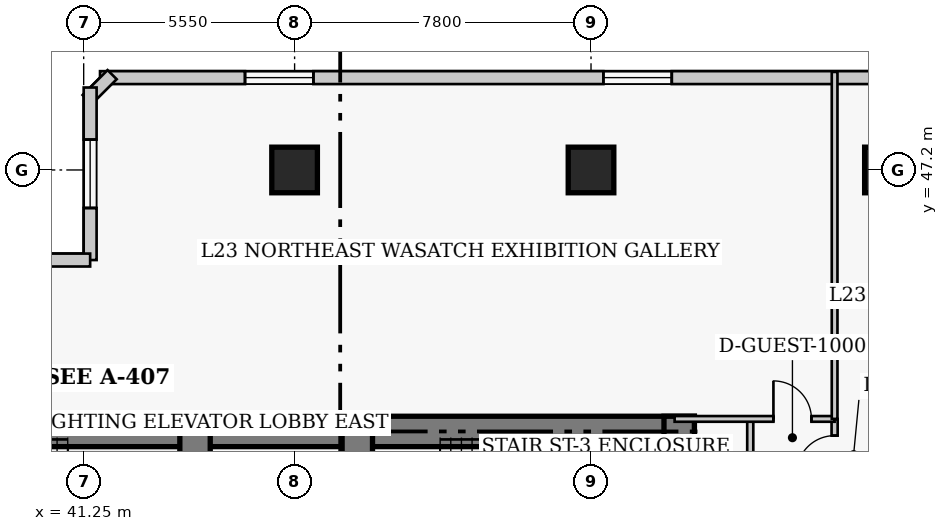
"""IFC4 building model, lengths in metres.
Left out: names, types, materials, properties, quantities, classifications, styles, units other than length and angle.
Written with IfcOpenShell. Run it as: python <this file> out.ifc"""

import sys

from ifc_helpers import new_model, si_unit, direction, frame, frame_2d, origin, origin_2d, place, context, subcontext, project, spatial, rectangle, extrude, element, fill, save


model = new_model("IFC4")
c1 = context("Model", 3, precision=1e-05, world=origin(), true_north=direction((0.0, 1.0)))
c2 = subcontext(c1, "Body", "Model", "MODEL_VIEW")
j1 = project(units=[si_unit("LENGTHUNIT", "METRE"), si_unit("PLANEANGLEUNIT", "RADIAN")], contexts=[c1])
p1 = place(None, origin())
s1 = spatial("IfcSite", under=j1, at=p1, CompositionType="ELEMENT")
p2 = place(p1, origin())
s2 = spatial("IfcBuilding", under=s1, at=p2, CompositionType="ELEMENT")
p3 = place(p2, frame((0.0, 0.0, 95.6)))
s3 = spatial("IfcBuildingStorey", under=s2, at=p3, CompositionType="ELEMENT", Elevation=95.6)
p4 = place(p3, frame((35.85, 40.32, 0.0), z_axis=(0.0, 0.0, 1.0), x_axis=(1.0, 0.0, 0.0)))
e1 = element("IfcWall", 1, at=p4, inside=s3, PredefinedType="SHEAR", context=c2, shape_type="SweptSolid", body=[
    extrude(rectangle(XDim=12.6, YDim=0.8, at=frame_2d((6.3, 0.0))), origin(), (0.0, 0.0, 1.0), 3.8),
])
p5 = place(p3, frame((48.45, 40.32, 0.0), z_axis=(0.0, 0.0, 1.0), x_axis=(1.0, 0.0, 0.0)))
e2 = element("IfcWall", 2, at=p5, inside=s3, PredefinedType="SHEAR", context=c2, shape_type="SweptSolid", body=[
    extrude(rectangle(XDim=8.87, YDim=0.8, at=frame_2d((4.435, 0.0))), origin(), (0.0, 0.0, 1.0), 3.8),
])
p6 = place(p3, frame((56.92, 27.05, 0.0), z_axis=(0.0, 0.0, 1.0), x_axis=(0.0, 1.0, 0.0)))
e3 = element("IfcWall", 3, at=p6, inside=s3, PredefinedType="SHEAR", context=c2, shape_type="SweptSolid", body=[
    extrude(rectangle(XDim=13.67, YDim=0.8, at=frame_2d((6.835, 0.0))), origin(), (0.0, 0.0, 1.0), 3.8),
])
p7 = place(p3, frame((44.18, 36.37, 0.0), z_axis=(0.0, 0.0, 1.0), x_axis=(0.0, 1.0, 0.0)))
e4 = element("IfcWall", 4, at=p7, inside=s3, PredefinedType="SHEAR", context=c2, shape_type="SweptSolid", body=[
    extrude(rectangle(XDim=3.95, YDim=0.8, at=frame_2d((1.975, 0.0))), origin(), (0.0, 0.0, 1.0), 3.8),
])
p8 = place(p3, frame((48.45, 32.35, 0.0), z_axis=(0.0, 0.0, 1.0), x_axis=(0.0, 1.0, 0.0)))
e5 = element("IfcWall", 5, at=p8, inside=s3, PredefinedType="SHEAR", context=c2, shape_type="SweptSolid", body=[
    extrude(rectangle(XDim=7.97, YDim=0.8, at=frame_2d((3.985, 0.0))), origin(), (0.0, 0.0, 1.0), 3.8),
])
p9 = place(p8, frame((5.85, 0.0, 0.0)))
e6 = element("IfcOpeningElement", 6, at=p9, cuts=e5, PredefinedType="OPENING", context=c2, shape_type="SweptSolid", body=[
    extrude(rectangle(XDim=1.1, YDim=2.15, at=frame_2d((0.55, 1.075))), frame((0.0, 0.41, 0.0), z_axis=(0.0, -1.0, 0.0), x_axis=(1.0, 0.0, 0.0)), (0.0, 0.0, 1.0), 0.82),
])
for number, where, z_axis, x_axis in (
    (7, (46.8, 47.2, 0.0), (0.0, 0.0, 1.0), (1.0, 0.0, 0.0)),
    (8, (54.6, 47.2, 0.0), (0.0, 0.0, 1.0), (1.0, 0.0, 0.0)),
    (9, (62.4, 47.2, 0.0), (0.0, 0.0, 1.0), (1.0, 0.0, 0.0)),
):
    element("IfcColumn", number, at=place(p3, frame(where, z_axis=z_axis, x_axis=x_axis)), inside=s3, PredefinedType="COLUMN", context=c2, shape_type="SweptSolid", body=[
        extrude(rectangle(XDim=1.2, YDim=1.2, at=origin_2d()), origin(), (0.0, 0.0, 1.0), 3.8),
    ])
p10 = place(p3, frame((69.97, 49.63, 0.0), z_axis=(0.0, 0.0, 1.0), x_axis=(-1.0, 0.0, 0.0)))
e10 = element("IfcWall", 10, at=p10, inside=s3, PredefinedType="SOLIDWALL", context=c2, shape_type="SweptSolid", body=[
    extrude(rectangle(XDim=28.29, YDim=0.34, at=frame_2d((14.145, 0.0))), origin(), (0.0, 0.0, 1.0), 3.54),
])
p11 = place(p10, frame((3.815, 0.0, 0.85)))
e11 = element("IfcOpeningElement", 11, at=p11, cuts=e10, PredefinedType="OPENING", context=c2, shape_type="SweptSolid", body=[
    extrude(rectangle(XDim=1.8, YDim=1.8, at=frame_2d((0.9, 0.9))), frame((0.0, 0.18, 0.0), z_axis=(0.0, -1.0, 0.0), x_axis=(1.0, 0.0, 0.0)), (0.0, 0.0, 1.0), 0.36),
])
p12 = place(p10, frame((13.245, 0.0, 0.85)))
e12 = element("IfcOpeningElement", 12, at=p12, cuts=e10, PredefinedType="OPENING", context=c2, shape_type="SweptSolid", body=[
    extrude(rectangle(XDim=1.8, YDim=1.8, at=frame_2d((0.9, 0.9))), frame((0.0, 0.18, 0.0), z_axis=(0.0, -1.0, 0.0), x_axis=(1.0, 0.0, 0.0)), (0.0, 0.0, 1.0), 0.36),
])
p13 = place(p10, frame((22.675, 0.0, 0.85)))
e13 = element("IfcOpeningElement", 13, at=p13, cuts=e10, PredefinedType="OPENING", context=c2, shape_type="SweptSolid", body=[
    extrude(rectangle(XDim=1.8, YDim=1.8, at=frame_2d((0.9, 0.9))), frame((0.0, 0.18, 0.0), z_axis=(0.0, -1.0, 0.0), x_axis=(1.0, 0.0, 0.0)), (0.0, 0.0, 1.0), 0.36),
])
p14 = place(p3, frame((41.999, 49.708, 0.0), z_axis=(0.0, 0.0, 1.0), x_axis=(-0.707238225886, -0.706975312048, 0.0)))
e14 = element("IfcWall", 14, at=p14, inside=s3, PredefinedType="SOLIDWALL", context=c2, shape_type="SweptSolid", body=[
    extrude(rectangle(XDim=0.929, YDim=0.34, at=frame_2d((0.464, 0.0))), origin(), (0.0, 0.0, 1.0), 3.54),
])
p15 = place(p3, frame((41.42, 49.37, 0.0), z_axis=(0.0, 0.0, 1.0), x_axis=(0.0, -1.0, 0.0)))
e15 = element("IfcWall", 15, at=p15, inside=s3, PredefinedType="SOLIDWALL", context=c2, shape_type="SweptSolid", body=[
    extrude(rectangle(XDim=4.54, YDim=0.34, at=frame_2d((2.27, 0.0))), origin(), (0.0, 0.0, 1.0), 3.54),
])
p16 = place(p15, frame((1.37, 0.0, 0.85)))
e16 = element("IfcOpeningElement", 16, at=p16, cuts=e15, PredefinedType="OPENING", context=c2, shape_type="SweptSolid", body=[
    extrude(rectangle(XDim=1.8, YDim=1.8, at=frame_2d((0.9, 0.9))), frame((0.0, 0.18, 0.0), z_axis=(0.0, -1.0, 0.0), x_axis=(1.0, 0.0, 0.0)), (0.0, 0.0, 1.0), 0.36),
])
p17 = place(p3, frame((41.42, 44.83, 0.0), z_axis=(0.0, 0.0, 1.0), x_axis=(-1.0, 0.0, 0.0)))
e17 = element("IfcWall", 17, at=p17, inside=s3, PredefinedType="SOLIDWALL", context=c2, shape_type="SweptSolid", body=[
    extrude(rectangle(XDim=4.84, YDim=0.34, at=frame_2d((2.42, 0.0))), origin(), (0.0, 0.0, 1.0), 3.54),
])
p18 = place(p17, frame((1.52, 0.0, 0.85)))
e18 = element("IfcOpeningElement", 18, at=p18, cuts=e17, PredefinedType="OPENING", context=c2, shape_type="SweptSolid", body=[
    extrude(rectangle(XDim=1.8, YDim=1.8, at=frame_2d((0.9, 0.9))), frame((0.0, 0.18, 0.0), z_axis=(0.0, -1.0, 0.0), x_axis=(1.0, 0.0, 0.0)), (0.0, 0.0, 1.0), 0.36),
])
p19 = place(p3, frame((61.01, 11.85, 0.0), z_axis=(0.0, 0.0, 1.0), x_axis=(0.0, 1.0, 0.0)))
e19 = element("IfcWall", 19, at=p19, inside=s3, PredefinedType="PARTITIONING", context=c2, shape_type="SweptSolid", body=[
    extrude(rectangle(XDim=28.8, YDim=0.16, at=frame_2d((14.4, 0.0))), origin(), (0.0, 0.0, 1.0), 3.54),
])
p20 = place(p19, frame((3.6, 0.0, 0.0)))
e20 = element("IfcOpeningElement", 20, at=p20, cuts=e19, PredefinedType="OPENING", context=c2, shape_type="SweptSolid", body=[
    extrude(rectangle(XDim=0.95, YDim=2.1, at=frame_2d((0.475, 1.05))), frame((0.0, 0.09, 0.0), z_axis=(0.0, -1.0, 0.0), x_axis=(1.0, 0.0, 0.0)), (0.0, 0.0, 1.0), 0.18),
])
p21 = place(p19, frame((10.019, 0.0, 0.0)))
e21 = element("IfcOpeningElement", 21, at=p21, cuts=e19, PredefinedType="OPENING", context=c2, shape_type="SweptSolid", body=[
    extrude(rectangle(XDim=0.95, YDim=2.1, at=frame_2d((0.475, 1.05))), frame((0.0, 0.09, 0.0), z_axis=(0.0, -1.0, 0.0), x_axis=(1.0, 0.0, 0.0)), (0.0, 0.0, 1.0), 0.18),
])
p22 = place(p19, frame((27.36, 0.0, 0.0)))
e22 = element("IfcOpeningElement", 22, at=p22, cuts=e19, PredefinedType="OPENING", context=c2, shape_type="SweptSolid", body=[
    extrude(rectangle(XDim=1.0, YDim=2.15, at=frame_2d((0.5, 1.075))), frame((0.0, 0.09, 0.0), z_axis=(0.0, -1.0, 0.0), x_axis=(1.0, 0.0, 0.0)), (0.0, 0.0, 1.0), 0.18),
])
p23 = place(p3, frame((58.79, 26.11, 0.0), z_axis=(0.0, 0.0, 1.0), x_axis=(0.0, 1.0, 0.0)))
e23 = element("IfcWall", 23, at=p23, inside=s3, PredefinedType="PARTITIONING", context=c2, shape_type="SweptSolid", body=[
    extrude(rectangle(XDim=14.54, YDim=0.16, at=frame_2d((7.27, 0.0))), origin(), (0.0, 0.0, 1.0), 3.54),
])
p24 = place(p3, frame((56.8, 40.65, 0.0), z_axis=(0.0, 0.0, 1.0), x_axis=(1.0, 0.0, 0.0)))
e24 = element("IfcWall", 24, at=p24, inside=s3, PredefinedType="PARTITIONING", context=c2, shape_type="SweptSolid", body=[
    extrude(rectangle(XDim=4.21, YDim=0.15, at=frame_2d((2.105, 0.0))), origin(), (0.0, 0.0, 1.0), 3.54),
])
p25 = place(p24, frame((2.6, 0.0, 0.0)))
e25 = element("IfcOpeningElement", 25, at=p25, cuts=e24, PredefinedType="OPENING", context=c2, shape_type="SweptSolid", body=[
    extrude(rectangle(XDim=1.0, YDim=2.15, at=frame_2d((0.5, 1.075))), frame((0.0, 0.085, 0.0), z_axis=(0.0, -1.0, 0.0), x_axis=(1.0, 0.0, 0.0)), (0.0, 0.0, 1.0), 0.17),
])
p26 = place(p3, frame((61.01, 40.65, 0.0), z_axis=(0.0, 0.0, 1.0), x_axis=(0.0, 1.0, 0.0)))
e26 = element("IfcWall", 26, at=p26, inside=s3, PredefinedType="PARTITIONING", context=c2, shape_type="SweptSolid", body=[
    extrude(rectangle(XDim=9.13, YDim=0.15, at=frame_2d((4.565, 0.0))), origin(), (0.0, 0.0, 1.0), 3.54),
])
p27 = place(p12, origin())
e27 = element("IfcWindow", 27, at=p27, inside=s3, PartitioningType="SINGLE_PANEL", PredefinedType="WINDOW", context=c2, shape_type="SweptSolid", body=[
    extrude(rectangle(XDim=1.8, YDim=1.8, at=frame_2d((0.9, 0.9))), frame((0.0, 0.03, 0.0), z_axis=(0.0, -1.0, 0.0), x_axis=(1.0, 0.0, 0.0)), (0.0, 0.0, 1.0), 0.06),
])
fill(e12, e27)
p28 = place(p13, origin())
e28 = element("IfcWindow", 28, at=p28, inside=s3, PartitioningType="SINGLE_PANEL", PredefinedType="WINDOW", context=c2, shape_type="SweptSolid", body=[
    extrude(rectangle(XDim=1.8, YDim=1.8, at=frame_2d((0.9, 0.9))), frame((0.0, 0.03, 0.0), z_axis=(0.0, -1.0, 0.0), x_axis=(1.0, 0.0, 0.0)), (0.0, 0.0, 1.0), 0.06),
])
fill(e13, e28)
p29 = place(p16, origin())
e29 = element("IfcWindow", 29, at=p29, inside=s3, PartitioningType="SINGLE_PANEL", PredefinedType="WINDOW", context=c2, shape_type="SweptSolid", body=[
    extrude(rectangle(XDim=1.8, YDim=1.8, at=frame_2d((0.9, 0.9))), frame((0.0, 0.03, 0.0), z_axis=(0.0, -1.0, 0.0), x_axis=(1.0, 0.0, 0.0)), (0.0, 0.0, 1.0), 0.06),
])
fill(e16, e29)
p30 = place(p25, origin())
e30 = element("IfcDoor", 30, at=p30, inside=s3, OperationType="SINGLE_SWING_LEFT", PredefinedType="DOOR", context=c2, shape_type="SweptSolid", body=[
    extrude(rectangle(XDim=1.0, YDim=2.15, at=frame_2d((0.5, 1.075))), frame((0.0, 0.025, 0.0), z_axis=(0.0, -1.0, 0.0), x_axis=(1.0, 0.0, 0.0)), (0.0, 0.0, 1.0), 0.05),
])
fill(e25, e30)
p31 = place(p22, origin())
e31 = element("IfcDoor", 31, at=p31, inside=s3, OperationType="SINGLE_SWING_LEFT", PredefinedType="DOOR", context=c2, shape_type="SweptSolid", body=[
    extrude(rectangle(XDim=1.0, YDim=2.15, at=frame_2d((0.5, 1.075))), frame((0.0, 0.025, 0.0), z_axis=(0.0, -1.0, 0.0), x_axis=(1.0, 0.0, 0.0)), (0.0, 0.0, 1.0), 0.05),
])
fill(e22, e31)
save(model, sys.argv[1])
